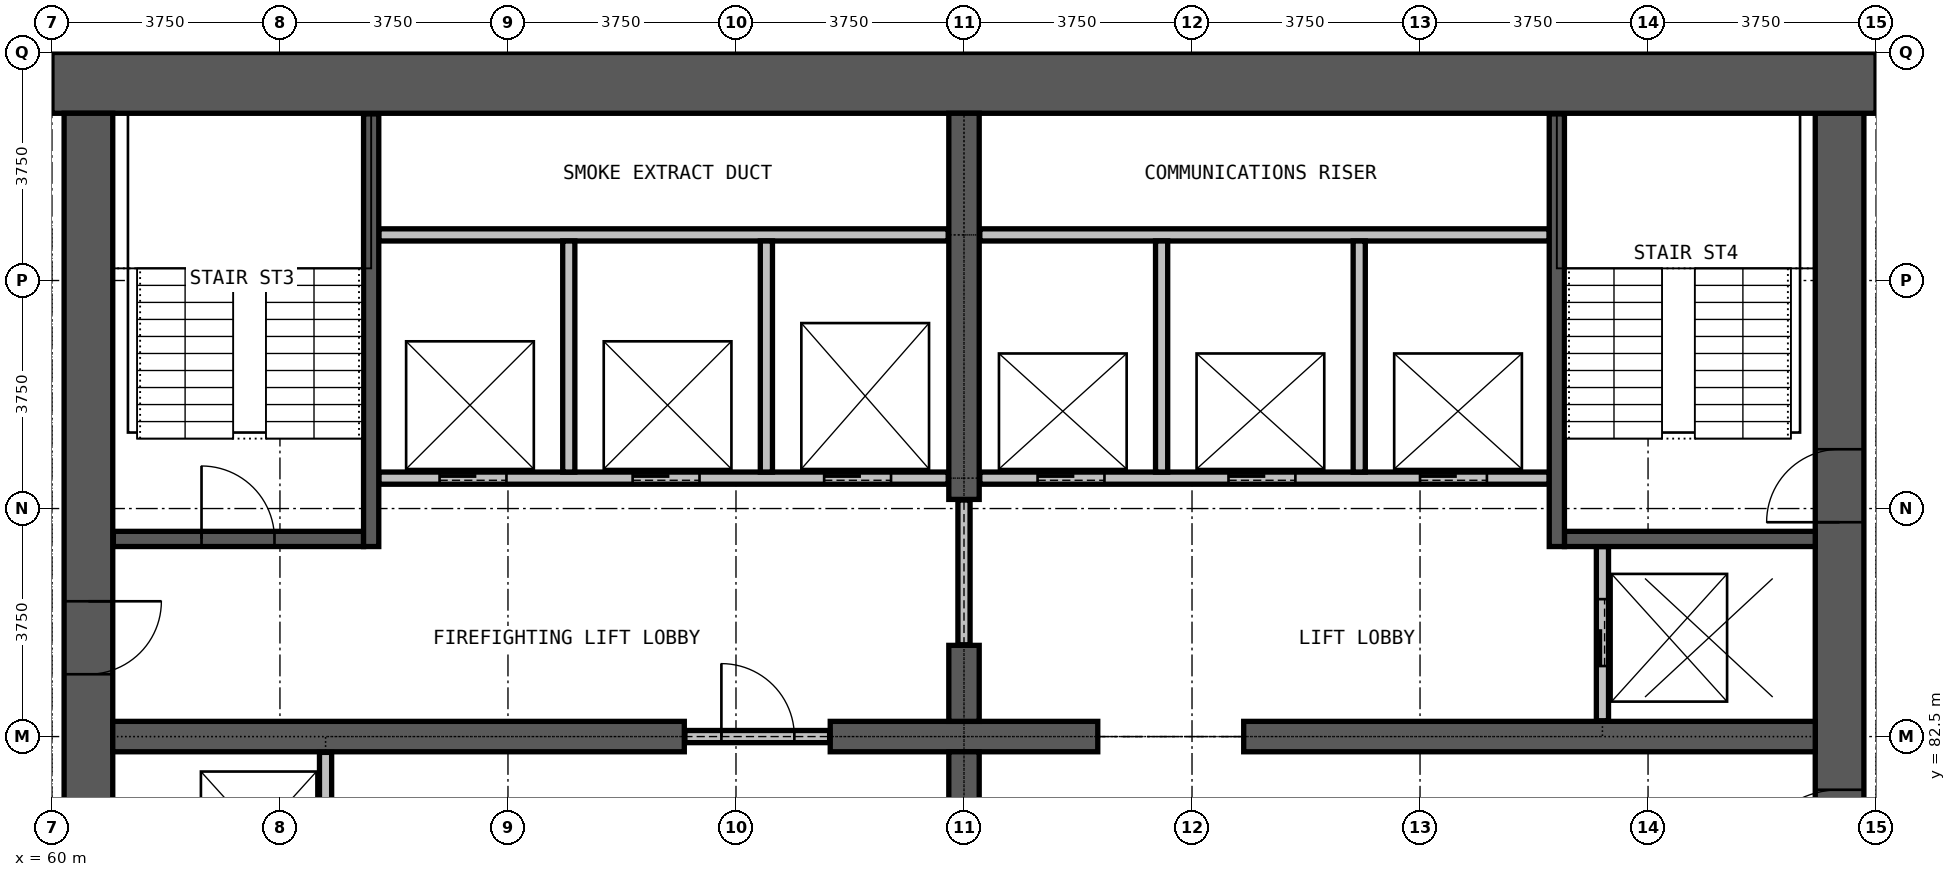
"""IFC4 building model, lengths in metres.
Left out: names, types, materials, properties, quantities, classifications, styles, units other than length and angle.
Written with IfcOpenShell. Run it as: python <this file> out.ifc"""

import sys

from ifc_helpers import new_model, si_unit, direction, frame, frame_2d, origin, place, context, subcontext, project, spatial, rectangle, extrude, element, fill, save


model = new_model("IFC4")
c1 = context("Model", 3, precision=1e-05, world=origin(), true_north=direction((0.0, 1.0)))
c2 = subcontext(c1, "Body", "Model", "MODEL_VIEW")
j1 = project(units=[si_unit("LENGTHUNIT", "METRE"), si_unit("PLANEANGLEUNIT", "RADIAN")], contexts=[c1])
p1 = place(None, origin())
s1 = spatial("IfcSite", under=j1, at=p1, CompositionType="ELEMENT")
p2 = place(p1, origin())
s2 = spatial("IfcBuilding", under=s1, at=p2, CompositionType="ELEMENT")
p3 = place(p2, frame((0.0, 0.0, 172.9)))
s3 = spatial("IfcBuildingStorey", under=s2, at=p3, CompositionType="ELEMENT", Elevation=172.9)
p4 = place(p3, frame((89.4, 72.25, 0.0), z_axis=(0.0, 0.0, 1.0), x_axis=(0.0, 1.0, 0.0)))
e1 = element("IfcWall", 1, at=p4, inside=s3, PredefinedType="SHEAR", context=c2, shape_type="SweptSolid", body=[
    extrude(rectangle(XDim=20.5, YDim=0.8, at=frame_2d((10.25, 0.0))), origin(), (0.0, 0.0, 1.0), 3.6),
])
p5 = place(p4, frame((0.275, 0.0, 0.0)))
e2 = element("IfcOpeningElement", 2, at=p5, cuts=e1, PredefinedType="OPENING", context=c2, shape_type="SweptSolid", body=[
    extrude(rectangle(XDim=1.2, YDim=2.2, at=frame_2d((0.6, 1.1))), frame((0.0, 0.41, 0.0), z_axis=(0.0, -1.0, 0.0), x_axis=(1.0, 0.0, 0.0)), (0.0, 0.0, 1.0), 0.82),
])
p6 = place(p4, frame((13.775, 0.0, 0.0)))
e3 = element("IfcOpeningElement", 3, at=p6, cuts=e1, PredefinedType="OPENING", context=c2, shape_type="SweptSolid", body=[
    extrude(rectangle(XDim=1.2, YDim=2.2, at=frame_2d((0.6, 1.1))), frame((0.0, 0.41, 0.0), z_axis=(0.0, -1.0, 0.0), x_axis=(1.0, 0.0, 0.0)), (0.0, 0.0, 1.0), 0.82),
])
p7 = place(p4, frame((7.875, 0.0, 0.0)))
e4 = element("IfcOpeningElement", 4, at=p7, cuts=e1, PredefinedType="OPENING", context=c2, shape_type="SweptSolid", body=[
    extrude(rectangle(XDim=1.5, YDim=2.2, at=frame_2d((0.75, 1.1))), frame((0.0, 0.41, 0.0), z_axis=(0.0, -1.0, 0.0), x_axis=(1.0, 0.0, 0.0)), (0.0, 0.0, 1.0), 0.82),
])
p8 = place(p3, frame((90.0, 93.25, 0.0), z_axis=(0.0, 0.0, 1.0), x_axis=(-1.0, 0.0, 0.0)))
e5 = element("IfcWall", 5, at=p8, inside=s3, PredefinedType="SHEAR", context=c2, shape_type="SweptSolid", body=[
    extrude(rectangle(XDim=30.0, YDim=1.0, at=frame_2d((15.0, 0.0))), origin(), (0.0, 0.0, 1.0), 3.6),
])
p9 = place(p3, frame((60.6, 92.75, 0.0), z_axis=(0.0, 0.0, 1.0), x_axis=(0.0, -1.0, 0.0)))
e6 = element("IfcWall", 6, at=p9, inside=s3, PredefinedType="SHEAR", context=c2, shape_type="SweptSolid", body=[
    extrude(rectangle(XDim=20.5, YDim=0.8, at=frame_2d((10.25, 0.0))), origin(), (0.0, 0.0, 1.0), 3.6),
])
p10 = place(p9, frame((19.025, 0.0, 0.0)))
e7 = element("IfcOpeningElement", 7, at=p10, cuts=e6, PredefinedType="OPENING", context=c2, shape_type="SweptSolid", body=[
    extrude(rectangle(XDim=1.2, YDim=2.2, at=frame_2d((0.6, 1.1))), frame((0.0, 0.41, 0.0), z_axis=(0.0, -1.0, 0.0), x_axis=(1.0, 0.0, 0.0)), (0.0, 0.0, 1.0), 0.82),
])
p11 = place(p9, frame((8.025, 0.0, 0.0)))
e8 = element("IfcOpeningElement", 8, at=p11, cuts=e6, PredefinedType="OPENING", context=c2, shape_type="SweptSolid", body=[
    extrude(rectangle(XDim=1.2, YDim=2.2, at=frame_2d((0.6, 1.1))), frame((0.0, 0.41, 0.0), z_axis=(0.0, -1.0, 0.0), x_axis=(1.0, 0.0, 0.0)), (0.0, 0.0, 1.0), 0.82),
])
p12 = place(p3, frame((61.0, 82.5, 0.0), z_axis=(0.0, 0.0, 1.0), x_axis=(1.0, 0.0, 0.0)))
e9 = element("IfcWall", 9, at=p12, inside=s3, PredefinedType="SHEAR", context=c2, shape_type="SweptSolid", body=[
    extrude(rectangle(XDim=9.4, YDim=0.5, at=frame_2d((4.7, 0.0))), origin(), (0.0, 0.0, 1.0), 3.6),
])
p13 = place(p3, frame((72.8, 82.5, 0.0), z_axis=(0.0, 0.0, 1.0), x_axis=(1.0, 0.0, 0.0)))
e10 = element("IfcWall", 10, at=p13, inside=s3, PredefinedType="SHEAR", context=c2, shape_type="SweptSolid", body=[
    extrude(rectangle(XDim=4.4, YDim=0.5, at=frame_2d((2.2, 0.0))), origin(), (0.0, 0.0, 1.0), 3.6),
])
p14 = place(p3, frame((79.6, 82.5, 0.0), z_axis=(0.0, 0.0, 1.0), x_axis=(1.0, 0.0, 0.0)))
e11 = element("IfcWall", 11, at=p14, inside=s3, PredefinedType="SHEAR", context=c2, shape_type="SweptSolid", body=[
    extrude(rectangle(XDim=9.4, YDim=0.5, at=frame_2d((4.7, 0.0))), origin(), (0.0, 0.0, 1.0), 3.6),
])
for number, where, z_axis, x_axis in (
    (12, (75.0, 81.0, 0.0), (0.0, 0.0, 1.0), (0.0, 1.0, 0.0)),
    (13, (75.0, 82.75, 0.0), (0.0, 0.0, 1.0), (0.0, 1.0, 0.0)),
):
    element("IfcWall", number, at=place(p3, frame(where, z_axis=z_axis, x_axis=x_axis)), inside=s3, PredefinedType="SHEAR", context=c2, shape_type="SweptSolid", body=[
        extrude(rectangle(XDim=1.25, YDim=0.5, at=frame_2d((0.625, 0.0))), origin(), (0.0, 0.0, 1.0), 3.6),
    ])
p15 = place(p3, frame((75.0, 86.4, 0.0), z_axis=(0.0, 0.0, 1.0), x_axis=(0.0, 1.0, 0.0)))
e14 = element("IfcWall", 14, at=p15, inside=s3, PredefinedType="SHEAR", context=c2, shape_type="SweptSolid", body=[
    extrude(rectangle(XDim=6.35, YDim=0.5, at=frame_2d((3.175, 0.0))), origin(), (0.0, 0.0, 1.0), 3.6),
])
p16 = place(p3, frame((70.41, 82.5, 0.0), z_axis=(0.0, 0.0, 1.0), x_axis=(1.0, 0.0, 0.0)))
e15 = element("IfcWall", 15, at=p16, inside=s3, PredefinedType="PARTITIONING", context=c2, shape_type="SweptSolid", body=[
    extrude(rectangle(XDim=2.38, YDim=0.2, at=frame_2d((1.19, 0.0))), origin(), (0.0, 0.0, 1.0), 2.4),
])
p17 = place(p16, frame((0.6, 0.0, 0.0)))
e16 = element("IfcOpeningElement", 16, at=p17, cuts=e15, PredefinedType="OPENING", context=c2, shape_type="SweptSolid", body=[
    extrude(rectangle(XDim=1.2, YDim=2.2, at=frame_2d((0.6, 1.1))), frame((0.0, 0.11, 0.0), z_axis=(0.0, -1.0, 0.0), x_axis=(1.0, 0.0, 0.0)), (0.0, 0.0, 1.0), 0.22),
])
p18 = place(p3, frame((75.0, 84.01, 0.0), z_axis=(0.0, 0.0, 1.0), x_axis=(0.0, 1.0, 0.0)))
e17 = element("IfcWall", 17, at=p18, inside=s3, PredefinedType="PARTITIONING", context=c2, shape_type="SweptSolid", body=[
    extrude(rectangle(XDim=2.38, YDim=0.2, at=frame_2d((1.19, 0.0))), origin(), (0.0, 0.0, 1.0), 2.4),
])
p19 = place(p3, frame((65.375, 86.75, 0.0), z_axis=(0.0, 0.0, 1.0), x_axis=(1.0, 0.0, 0.0)))
e18 = element("IfcWall", 18, at=p19, inside=s3, PredefinedType="PARTITIONING", context=c2, shape_type="SweptSolid", body=[
    extrude(rectangle(XDim=9.365, YDim=0.2, at=frame_2d((4.683, 0.0))), origin(), (0.0, 0.0, 1.0), 3.3),
])
p20 = place(p19, frame((1.0, 0.0, 0.0)))
e19 = element("IfcOpeningElement", 19, at=p20, cuts=e18, PredefinedType="OPENING", context=c2, shape_type="SweptSolid", body=[
    extrude(rectangle(XDim=1.1, YDim=2.2, at=frame_2d((0.55, 1.1))), frame((0.0, 0.11, 0.0), z_axis=(0.0, -1.0, 0.0), x_axis=(1.0, 0.0, 0.0)), (0.0, 0.0, 1.0), 0.22),
])
p21 = place(p19, frame((4.175, 0.0, 0.0)))
e20 = element("IfcOpeningElement", 20, at=p21, cuts=e18, PredefinedType="OPENING", context=c2, shape_type="SweptSolid", body=[
    extrude(rectangle(XDim=1.1, YDim=2.2, at=frame_2d((0.55, 1.1))), frame((0.0, 0.11, 0.0), z_axis=(0.0, -1.0, 0.0), x_axis=(1.0, 0.0, 0.0)), (0.0, 0.0, 1.0), 0.22),
])
p22 = place(p19, frame((7.325, 0.0, 0.0)))
e21 = element("IfcOpeningElement", 21, at=p22, cuts=e18, PredefinedType="OPENING", context=c2, shape_type="SweptSolid", body=[
    extrude(rectangle(XDim=1.1, YDim=2.2, at=frame_2d((0.55, 1.1))), frame((0.0, 0.11, 0.0), z_axis=(0.0, -1.0, 0.0), x_axis=(1.0, 0.0, 0.0)), (0.0, 0.0, 1.0), 0.22),
])
p23 = place(p3, frame((75.26, 86.75, 0.0), z_axis=(0.0, 0.0, 1.0), x_axis=(1.0, 0.0, 0.0)))
e22 = element("IfcWall", 22, at=p23, inside=s3, PredefinedType="PARTITIONING", context=c2, shape_type="SweptSolid", body=[
    extrude(rectangle(XDim=9.365, YDim=0.2, at=frame_2d((4.683, 0.0))), origin(), (0.0, 0.0, 1.0), 3.3),
])
p24 = place(p23, frame((0.95, 0.0, 0.0)))
e23 = element("IfcOpeningElement", 23, at=p24, cuts=e22, PredefinedType="OPENING", context=c2, shape_type="SweptSolid", body=[
    extrude(rectangle(XDim=1.1, YDim=2.2, at=frame_2d((0.55, 1.1))), frame((0.0, 0.11, 0.0), z_axis=(0.0, -1.0, 0.0), x_axis=(1.0, 0.0, 0.0)), (0.0, 0.0, 1.0), 0.22),
])
p25 = place(p23, frame((4.09, 0.0, 0.0)))
e24 = element("IfcOpeningElement", 24, at=p25, cuts=e22, PredefinedType="OPENING", context=c2, shape_type="SweptSolid", body=[
    extrude(rectangle(XDim=1.1, YDim=2.2, at=frame_2d((0.55, 1.1))), frame((0.0, 0.11, 0.0), z_axis=(0.0, -1.0, 0.0), x_axis=(1.0, 0.0, 0.0)), (0.0, 0.0, 1.0), 0.22),
])
p26 = place(p23, frame((7.24, 0.0, 0.0)))
e25 = element("IfcOpeningElement", 25, at=p26, cuts=e22, PredefinedType="OPENING", context=c2, shape_type="SweptSolid", body=[
    extrude(rectangle(XDim=1.1, YDim=2.2, at=frame_2d((0.55, 1.1))), frame((0.0, 0.11, 0.0), z_axis=(0.0, -1.0, 0.0), x_axis=(1.0, 0.0, 0.0)), (0.0, 0.0, 1.0), 0.22),
])
for number, where, z_axis, x_axis in (
    (26, (65.375, 90.75, 0.0), (0.0, 0.0, 1.0), (1.0, 0.0, 0.0)),
    (27, (75.26, 90.75, 0.0), (0.0, 0.0, 1.0), (1.0, 0.0, 0.0)),
):
    element("IfcWall", number, at=place(p3, frame(where, z_axis=z_axis, x_axis=x_axis)), inside=s3, PredefinedType="PARTITIONING", context=c2, shape_type="SweptSolid", body=[
        extrude(rectangle(XDim=9.365, YDim=0.2, at=frame_2d((4.683, 0.0))), origin(), (0.0, 0.0, 1.0), 3.3),
    ])
p27 = place(p3, frame((64.5, 79.375, 0.0), z_axis=(0.0, 0.0, 1.0), x_axis=(0.0, 1.0, 0.0)))
e28 = element("IfcWall", 28, at=p27, inside=s3, PredefinedType="PARTITIONING", context=c2, shape_type="SweptSolid", body=[
    extrude(rectangle(XDim=2.865, YDim=0.2, at=frame_2d((1.433, 0.0))), origin(), (0.0, 0.0, 1.0), 3.3),
])
for number, where, z_axis, x_axis in (
    (29, (68.5, 86.85, 0.0), (0.0, 0.0, 1.0), (0.0, 1.0, 0.0)),
    (30, (71.75, 86.85, 0.0), (0.0, 0.0, 1.0), (0.0, 1.0, 0.0)),
    (31, (78.25, 86.85, 0.0), (0.0, 0.0, 1.0), (0.0, 1.0, 0.0)),
    (32, (81.5, 86.85, 0.0), (0.0, 0.0, 1.0), (0.0, 1.0, 0.0)),
):
    element("IfcWall", number, at=place(p3, frame(where, z_axis=z_axis, x_axis=x_axis)), inside=s3, PredefinedType="PARTITIONING", context=c2, shape_type="SweptSolid", body=[
        extrude(rectangle(XDim=3.8, YDim=0.2, at=frame_2d((1.9, 0.0))), origin(), (0.0, 0.0, 1.0), 3.3),
    ])
p28 = place(p3, frame((85.5, 82.76, 0.0), z_axis=(0.0, 0.0, 1.0), x_axis=(0.0, 1.0, 0.0)))
e33 = element("IfcWall", 33, at=p28, inside=s3, PredefinedType="PARTITIONING", context=c2, shape_type="SweptSolid", body=[
    extrude(rectangle(XDim=2.865, YDim=0.2, at=frame_2d((1.433, 0.0))), origin(), (0.0, 0.0, 1.0), 3.3),
])
p29 = place(p28, frame((0.9, 0.0, 0.0)))
e34 = element("IfcOpeningElement", 34, at=p29, cuts=e33, PredefinedType="OPENING", context=c2, shape_type="SweptSolid", body=[
    extrude(rectangle(XDim=1.1, YDim=2.2, at=frame_2d((0.55, 1.1))), frame((0.0, 0.11, 0.0), z_axis=(0.0, -1.0, 0.0), x_axis=(1.0, 0.0, 0.0)), (0.0, 0.0, 1.0), 0.22),
])
p30 = place(p3, frame((61.01, 85.75, 0.0), z_axis=(0.0, 0.0, 1.0), x_axis=(1.0, 0.0, 0.0)))
e35 = element("IfcWall", 35, at=p30, inside=s3, PredefinedType="PARTITIONING", context=c2, shape_type="SweptSolid", body=[
    extrude(rectangle(XDim=4.115, YDim=0.25, at=frame_2d((2.058, 0.0))), origin(), (0.0, 0.0, 1.0), 3.3),
])
p31 = place(p30, frame((1.45, 0.0, 0.0)))
e36 = element("IfcOpeningElement", 36, at=p31, cuts=e35, PredefinedType="OPENING", context=c2, shape_type="SweptSolid", body=[
    extrude(rectangle(XDim=1.2, YDim=2.2, at=frame_2d((0.6, 1.1))), frame((0.0, 0.135, 0.0), z_axis=(0.0, -1.0, 0.0), x_axis=(1.0, 0.0, 0.0)), (0.0, 0.0, 1.0), 0.27),
])
p32 = place(p3, frame((84.875, 85.75, 0.0), z_axis=(0.0, 0.0, 1.0), x_axis=(1.0, 0.0, 0.0)))
e37 = element("IfcWall", 37, at=p32, inside=s3, PredefinedType="PARTITIONING", context=c2, shape_type="SweptSolid", body=[
    extrude(rectangle(XDim=4.125, YDim=0.25, at=frame_2d((2.062, 0.0))), origin(), (0.0, 0.0, 1.0), 3.3),
])
for number, where, z_axis, x_axis in (
    (38, (65.25, 85.625, 0.0), (0.0, 0.0, 1.0), (0.0, 1.0, 0.0)),
    (39, (84.75, 85.625, 0.0), (0.0, 0.0, 1.0), (0.0, 1.0, 0.0)),
):
    element("IfcWall", number, at=place(p3, frame(where, z_axis=z_axis, x_axis=x_axis)), inside=s3, PredefinedType="PARTITIONING", context=c2, shape_type="SweptSolid", body=[
        extrude(rectangle(XDim=7.115, YDim=0.25, at=frame_2d((3.558, 0.0))), origin(), (0.0, 0.0, 1.0), 3.3),
    ])
p33 = place(p24, origin())
e40 = element("IfcDoor", 40, at=p33, inside=s3, OperationType="DOUBLE_DOOR_SLIDING", PredefinedType="DOOR", context=c2, shape_type="SweptSolid", body=[
    extrude(rectangle(XDim=1.1, YDim=2.2, at=frame_2d((0.55, 1.1))), frame((0.0, 0.025, 0.0), z_axis=(0.0, -1.0, 0.0), x_axis=(1.0, 0.0, 0.0)), (0.0, 0.0, 1.0), 0.05),
])
fill(e23, e40)
p34 = place(p25, origin())
e41 = element("IfcDoor", 41, at=p34, inside=s3, OperationType="DOUBLE_DOOR_SLIDING", PredefinedType="DOOR", context=c2, shape_type="SweptSolid", body=[
    extrude(rectangle(XDim=1.1, YDim=2.2, at=frame_2d((0.55, 1.1))), frame((0.0, 0.025, 0.0), z_axis=(0.0, -1.0, 0.0), x_axis=(1.0, 0.0, 0.0)), (0.0, 0.0, 1.0), 0.05),
])
fill(e24, e41)
p35 = place(p26, origin())
e42 = element("IfcDoor", 42, at=p35, inside=s3, OperationType="DOUBLE_DOOR_SLIDING", PredefinedType="DOOR", context=c2, shape_type="SweptSolid", body=[
    extrude(rectangle(XDim=1.1, YDim=2.2, at=frame_2d((0.55, 1.1))), frame((0.0, 0.025, 0.0), z_axis=(0.0, -1.0, 0.0), x_axis=(1.0, 0.0, 0.0)), (0.0, 0.0, 1.0), 0.05),
])
fill(e25, e42)
p36 = place(p20, origin())
e43 = element("IfcDoor", 43, at=p36, inside=s3, OperationType="DOUBLE_DOOR_SLIDING", PredefinedType="DOOR", context=c2, shape_type="SweptSolid", body=[
    extrude(rectangle(XDim=1.1, YDim=2.2, at=frame_2d((0.55, 1.1))), frame((0.0, 0.025, 0.0), z_axis=(0.0, -1.0, 0.0), x_axis=(1.0, 0.0, 0.0)), (0.0, 0.0, 1.0), 0.05),
])
fill(e19, e43)
p37 = place(p21, origin())
e44 = element("IfcDoor", 44, at=p37, inside=s3, OperationType="DOUBLE_DOOR_SLIDING", PredefinedType="DOOR", context=c2, shape_type="SweptSolid", body=[
    extrude(rectangle(XDim=1.1, YDim=2.2, at=frame_2d((0.55, 1.1))), frame((0.0, 0.025, 0.0), z_axis=(0.0, -1.0, 0.0), x_axis=(1.0, 0.0, 0.0)), (0.0, 0.0, 1.0), 0.05),
])
fill(e20, e44)
p38 = place(p22, origin())
e45 = element("IfcDoor", 45, at=p38, inside=s3, OperationType="DOUBLE_DOOR_SLIDING", PredefinedType="DOOR", context=c2, shape_type="SweptSolid", body=[
    extrude(rectangle(XDim=1.1, YDim=2.2, at=frame_2d((0.55, 1.1))), frame((0.0, 0.025, 0.0), z_axis=(0.0, -1.0, 0.0), x_axis=(1.0, 0.0, 0.0)), (0.0, 0.0, 1.0), 0.05),
])
fill(e21, e45)
p39 = place(p29, origin())
e46 = element("IfcDoor", 46, at=p39, inside=s3, OperationType="DOUBLE_DOOR_SLIDING", PredefinedType="DOOR", context=c2, shape_type="SweptSolid", body=[
    extrude(rectangle(XDim=1.1, YDim=2.2, at=frame_2d((0.55, 1.1))), frame((0.0, 0.025, 0.0), z_axis=(0.0, -1.0, 0.0), x_axis=(1.0, 0.0, 0.0)), (0.0, 0.0, 1.0), 0.05),
])
fill(e34, e46)
p40 = place(p17, origin())
e47 = element("IfcDoor", 47, at=p40, inside=s3, OperationType="SINGLE_SWING_LEFT", PredefinedType="DOOR", context=c2, shape_type="SweptSolid", body=[
    extrude(rectangle(XDim=1.2, YDim=2.2, at=frame_2d((0.6, 1.1))), frame((0.0, 0.025, 0.0), z_axis=(0.0, -1.0, 0.0), x_axis=(1.0, 0.0, 0.0)), (0.0, 0.0, 1.0), 0.05),
])
fill(e16, e47)
p41 = place(p31, origin())
e48 = element("IfcDoor", 48, at=p41, inside=s3, OperationType="SINGLE_SWING_LEFT", PredefinedType="DOOR", context=c2, shape_type="SweptSolid", body=[
    extrude(rectangle(XDim=1.2, YDim=2.2, at=frame_2d((0.6, 1.1))), frame((0.0, 0.025, 0.0), z_axis=(0.0, -1.0, 0.0), x_axis=(1.0, 0.0, 0.0)), (0.0, 0.0, 1.0), 0.05),
])
fill(e36, e48)
p42 = place(p6, origin())
e49 = element("IfcDoor", 49, at=p42, inside=s3, OperationType="SINGLE_SWING_RIGHT", PredefinedType="DOOR", context=c2, shape_type="SweptSolid", body=[
    extrude(rectangle(XDim=1.2, YDim=2.2, at=frame_2d((0.6, 1.1))), frame((0.0, 0.025, 0.0), z_axis=(0.0, -1.0, 0.0), x_axis=(1.0, 0.0, 0.0)), (0.0, 0.0, 1.0), 0.05),
])
fill(e3, e49)
p43 = place(p7, origin())
e50 = element("IfcDoor", 50, at=p43, inside=s3, OperationType="DOUBLE_DOOR_SINGLE_SWING", PredefinedType="DOOR", context=c2, shape_type="SweptSolid", body=[
    extrude(rectangle(XDim=1.5, YDim=2.2, at=frame_2d((0.75, 1.1))), frame((0.0, 0.025, 0.0), z_axis=(0.0, -1.0, 0.0), x_axis=(1.0, 0.0, 0.0)), (0.0, 0.0, 1.0), 0.05),
])
fill(e4, e50)
p44 = place(p11, origin())
e51 = element("IfcDoor", 51, at=p44, inside=s3, OperationType="SINGLE_SWING_LEFT", PredefinedType="DOOR", context=c2, shape_type="SweptSolid", body=[
    extrude(rectangle(XDim=1.2, YDim=2.2, at=frame_2d((0.6, 1.1))), frame((0.0, 0.025, 0.0), z_axis=(0.0, -1.0, 0.0), x_axis=(1.0, 0.0, 0.0)), (0.0, 0.0, 1.0), 0.05),
])
fill(e8, e51)
save(model, sys.argv[1])
